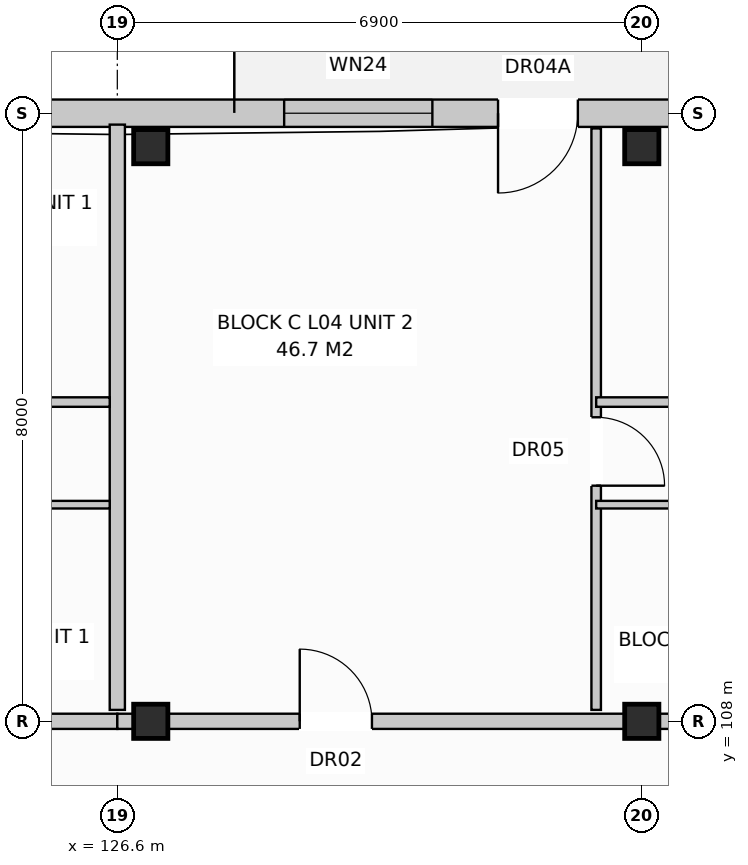
"""IFC4 building model, lengths in metres.
Left out: names, types, materials, properties, quantities, classifications, styles, units other than length and angle.
Written with IfcOpenShell. Run it as: python <this file> out.ifc"""

import sys

from ifc_helpers import new_model, si_unit, direction, frame, frame_2d, origin, origin_with_axes, origin_2d, place, context, subcontext, project, spatial, rectangle, extrude, element, fill, save


model = new_model("IFC4")
c1 = context("Model", 3, precision=1e-05, world=origin(), true_north=direction((0.0, 1.0)))
c2 = subcontext(c1, "Body", "Model", "MODEL_VIEW")
j1 = project(units=[si_unit("LENGTHUNIT", "METRE"), si_unit("PLANEANGLEUNIT", "RADIAN")], contexts=[c1])
p1 = place(None, origin())
s1 = spatial("IfcSite", under=j1, at=p1, CompositionType="ELEMENT")
p2 = place(p1, origin())
s2 = spatial("IfcBuilding", under=s1, at=p2, CompositionType="ELEMENT")
p3 = place(p2, frame((0.0, 0.0, 14.4)))
s3 = spatial("IfcBuildingStorey", under=s2, at=p3, CompositionType="ELEMENT", Elevation=14.4)
for number, where, z_axis, x_axis in (
    (1, (127.04, 108.0, 0.0), (0.0, 0.0, 1.0), (1.0, 0.0, 0.0)),
    (2, (127.04, 115.56, 0.0), (0.0, 0.0, 1.0), (1.0, 0.0, 0.0)),
    (3, (133.5, 108.0, 0.0), (0.0, 0.0, 1.0), (1.0, 0.0, 0.0)),
    (4, (133.5, 115.56, 0.0), (0.0, 0.0, 1.0), (1.0, 0.0, 0.0)),
):
    element("IfcColumn", number, at=place(p3, frame(where, z_axis=z_axis, x_axis=x_axis)), inside=s3, PredefinedType="COLUMN", context=c2, shape_type="SweptSolid", body=[
        extrude(rectangle(XDim=0.45, YDim=0.45, at=origin_2d()), origin(), (0.0, 0.0, 1.0), 3.2),
    ])
p4 = place(p3, frame((112.97, 116.0, 0.0), z_axis=(0.0, 0.0, 1.0), x_axis=(1.0, 0.0, 0.0)))
e5 = element("IfcWall", 5, at=p4, inside=s3, PredefinedType="STANDARD", context=c2, shape_type="SweptSolid", body=[
    extrude(rectangle(XDim=54.86, YDim=0.36, at=frame_2d((27.43, 0.0))), origin(), (0.0, 0.0, 1.0), 2.94),
])
p5 = place(p4, frame((3.779, 0.0, 0.0)))
e6 = element("IfcOpeningElement", 6, at=p5, cuts=e5, PredefinedType="OPENING", context=c2, shape_type="SweptSolid", body=[
    extrude(rectangle(XDim=1.05, YDim=2.12, at=frame_2d((0.525, 1.06))), frame((0.0, 0.192, 0.0), z_axis=(0.0, -1.0, 0.0), x_axis=(1.0, 0.0, 0.0)), (0.0, 0.0, 1.0), 0.384),
])
p6 = place(p4, frame((18.639, 0.0, 0.0)))
e7 = element("IfcOpeningElement", 7, at=p6, cuts=e5, PredefinedType="OPENING", context=c2, shape_type="SweptSolid", body=[
    extrude(rectangle(XDim=1.05, YDim=2.12, at=frame_2d((0.525, 1.06))), frame((0.0, 0.192, 0.0), z_axis=(0.0, -1.0, 0.0), x_axis=(1.0, 0.0, 0.0)), (0.0, 0.0, 1.0), 0.384),
])
p7 = place(p4, frame((29.039, 0.0, 0.0)))
e8 = element("IfcOpeningElement", 8, at=p7, cuts=e5, PredefinedType="OPENING", context=c2, shape_type="SweptSolid", body=[
    extrude(rectangle(XDim=1.05, YDim=2.12, at=frame_2d((0.525, 1.06))), frame((0.0, 0.192, 0.0), z_axis=(0.0, -1.0, 0.0), x_axis=(1.0, 0.0, 0.0)), (0.0, 0.0, 1.0), 0.384),
])
p8 = place(p4, frame((46.45, 0.0, 0.0)))
e9 = element("IfcOpeningElement", 9, at=p8, cuts=e5, PredefinedType="OPENING", context=c2, shape_type="SweptSolid", body=[
    extrude(rectangle(XDim=1.05, YDim=2.12, at=frame_2d((0.525, 1.06))), frame((0.0, 0.192, 0.0), z_axis=(0.0, -1.0, 0.0), x_axis=(1.0, 0.0, 0.0)), (0.0, 0.0, 1.0), 0.384),
])
p9 = place(p4, frame((1.525, 0.0, 0.8)))
e10 = element("IfcOpeningElement", 10, at=p9, cuts=e5, PredefinedType="OPENING", context=c2, shape_type="SweptSolid", body=[
    extrude(rectangle(XDim=1.95, YDim=1.65, at=frame_2d((0.975, 0.825))), frame((0.0, 0.192, 0.0), z_axis=(0.0, -1.0, 0.0), x_axis=(1.0, 0.0, 0.0)), (0.0, 0.0, 1.0), 0.384),
])
p10 = place(p4, frame((7.65, 0.0, 0.72)))
e11 = element("IfcOpeningElement", 11, at=p10, cuts=e5, PredefinedType="OPENING", context=c2, shape_type="SweptSolid", body=[
    extrude(rectangle(XDim=1.1, YDim=1.5, at=frame_2d((0.55, 0.75))), frame((0.0, 0.192, 0.0), z_axis=(0.0, -1.0, 0.0), x_axis=(1.0, 0.0, 0.0)), (0.0, 0.0, 1.0), 0.384),
])
p11 = place(p4, frame((10.45, 0.0, 0.8)))
e12 = element("IfcOpeningElement", 12, at=p11, cuts=e5, PredefinedType="OPENING", context=c2, shape_type="SweptSolid", body=[
    extrude(rectangle(XDim=1.9, YDim=1.85, at=frame_2d((0.95, 0.925))), frame((0.0, 0.192, 0.0), z_axis=(0.0, -1.0, 0.0), x_axis=(1.0, 0.0, 0.0)), (0.0, 0.0, 1.0), 0.384),
])
p12 = place(p4, frame((15.825, 0.0, 0.8)))
e13 = element("IfcOpeningElement", 13, at=p12, cuts=e5, PredefinedType="OPENING", context=c2, shape_type="SweptSolid", body=[
    extrude(rectangle(XDim=1.95, YDim=1.65, at=frame_2d((0.975, 0.825))), frame((0.0, 0.192, 0.0), z_axis=(0.0, -1.0, 0.0), x_axis=(1.0, 0.0, 0.0)), (0.0, 0.0, 1.0), 0.384),
])
p13 = place(p4, frame((21.6, 0.0, 0.8)))
e14 = element("IfcOpeningElement", 14, at=p13, cuts=e5, PredefinedType="OPENING", context=c2, shape_type="SweptSolid", body=[
    extrude(rectangle(XDim=1.8, YDim=1.7, at=frame_2d((0.9, 0.85))), frame((0.0, 0.192, 0.0), z_axis=(0.0, -1.0, 0.0), x_axis=(1.0, 0.0, 0.0)), (0.0, 0.0, 1.0), 0.384),
])
p14 = place(p4, frame((25.6, 0.0, 0.72)))
e15 = element("IfcOpeningElement", 15, at=p14, cuts=e5, PredefinedType="OPENING", context=c2, shape_type="SweptSolid", body=[
    extrude(rectangle(XDim=1.1, YDim=1.5, at=frame_2d((0.55, 0.75))), frame((0.0, 0.192, 0.0), z_axis=(0.0, -1.0, 0.0), x_axis=(1.0, 0.0, 0.0)), (0.0, 0.0, 1.0), 0.384),
])
p15 = place(p4, frame((31.325, 0.0, 0.8)))
e16 = element("IfcOpeningElement", 16, at=p15, cuts=e5, PredefinedType="OPENING", context=c2, shape_type="SweptSolid", body=[
    extrude(rectangle(XDim=1.95, YDim=1.65, at=frame_2d((0.975, 0.825))), frame((0.0, 0.192, 0.0), z_axis=(0.0, -1.0, 0.0), x_axis=(1.0, 0.0, 0.0)), (0.0, 0.0, 1.0), 0.384),
])
p16 = place(p4, frame((35.6, 0.0, 0.8)))
e17 = element("IfcOpeningElement", 17, at=p16, cuts=e5, PredefinedType="OPENING", context=c2, shape_type="SweptSolid", body=[
    extrude(rectangle(XDim=1.8, YDim=1.7, at=frame_2d((0.9, 0.85))), frame((0.0, 0.192, 0.0), z_axis=(0.0, -1.0, 0.0), x_axis=(1.0, 0.0, 0.0)), (0.0, 0.0, 1.0), 0.384),
])
p17 = place(p4, frame((39.25, 0.0, 0.72)))
e18 = element("IfcOpeningElement", 18, at=p17, cuts=e5, PredefinedType="OPENING", context=c2, shape_type="SweptSolid", body=[
    extrude(rectangle(XDim=1.1, YDim=1.5, at=frame_2d((0.55, 0.75))), frame((0.0, 0.192, 0.0), z_axis=(0.0, -1.0, 0.0), x_axis=(1.0, 0.0, 0.0)), (0.0, 0.0, 1.0), 0.384),
])
p18 = place(p4, frame((44.225, 0.0, 0.8)))
e19 = element("IfcOpeningElement", 19, at=p18, cuts=e5, PredefinedType="OPENING", context=c2, shape_type="SweptSolid", body=[
    extrude(rectangle(XDim=1.95, YDim=1.65, at=frame_2d((0.975, 0.825))), frame((0.0, 0.192, 0.0), z_axis=(0.0, -1.0, 0.0), x_axis=(1.0, 0.0, 0.0)), (0.0, 0.0, 1.0), 0.384),
])
p19 = place(p4, frame((49.2, 0.0, 0.8)))
e20 = element("IfcOpeningElement", 20, at=p19, cuts=e5, PredefinedType="OPENING", context=c2, shape_type="SweptSolid", body=[
    extrude(rectangle(XDim=1.8, YDim=1.7, at=frame_2d((0.9, 0.85))), frame((0.0, 0.192, 0.0), z_axis=(0.0, -1.0, 0.0), x_axis=(1.0, 0.0, 0.0)), (0.0, 0.0, 1.0), 0.384),
])
p20 = place(p4, frame((52.95, 0.0, 0.72)))
e21 = element("IfcOpeningElement", 21, at=p20, cuts=e5, PredefinedType="OPENING", context=c2, shape_type="SweptSolid", body=[
    extrude(rectangle(XDim=1.1, YDim=1.5, at=frame_2d((0.55, 0.75))), frame((0.0, 0.192, 0.0), z_axis=(0.0, -1.0, 0.0), x_axis=(1.0, 0.0, 0.0)), (0.0, 0.0, 1.0), 0.384),
])
p21 = place(p3, frame((126.6, 108.15, 0.0), z_axis=(0.0, 0.0, 1.0), x_axis=(0.0, 1.0, 0.0)))
e22 = element("IfcWall", 22, at=p21, inside=s3, PredefinedType="PARTITIONING", context=c2, shape_type="SweptSolid", body=[
    extrude(rectangle(XDim=7.7, YDim=0.2, at=frame_2d((3.85, 0.0))), origin(), (0.0, 0.0, 1.0), 2.94),
])
p22 = place(p3, frame((112.8, 108.0, 0.0), z_axis=(0.0, 0.0, 1.0), x_axis=(1.0, 0.0, 0.0)))
e23 = element("IfcWall", 23, at=p22, inside=s3, PredefinedType="PARTITIONING", context=c2, shape_type="SweptSolid", body=[
    extrude(rectangle(XDim=13.8, YDim=0.2, at=frame_2d((6.9, 0.0))), origin(), (0.0, 0.0, 1.0), 2.38),
])
p23 = place(p22, frame((2.4, 0.0, 0.0)))
e24 = element("IfcOpeningElement", 24, at=p23, cuts=e23, PredefinedType="OPENING", context=c2, shape_type="SweptSolid", body=[
    extrude(rectangle(XDim=0.95, YDim=2.15, at=frame_2d((0.475, 1.075))), frame((0.0, 0.112, 0.0), z_axis=(0.0, -1.0, 0.0), x_axis=(1.0, 0.0, 0.0)), (0.0, 0.0, 1.0), 0.224),
])
p24 = place(p3, frame((118.0, 110.85, 0.0), z_axis=(0.0, 0.0, 1.0), x_axis=(1.0, 0.0, 0.0)))
e25 = element("IfcWall", 25, at=p24, inside=s3, PredefinedType="PARTITIONING", context=c2, shape_type="SweptSolid", body=[
    extrude(rectangle(XDim=8.5, YDim=0.1, at=frame_2d((4.25, 0.0))), origin(), (0.0, 0.0, 1.0), 2.94),
])
p25 = place(p24, frame((1.0, 0.0, 0.0)))
e26 = element("IfcOpeningElement", 26, at=p25, cuts=e25, PredefinedType="OPENING", context=c2, shape_type="SweptSolid", body=[
    extrude(rectangle(XDim=0.85, YDim=2.1, at=frame_2d((0.425, 1.05))), frame((0.0, 0.062, 0.0), z_axis=(0.0, -1.0, 0.0), x_axis=(1.0, 0.0, 0.0)), (0.0, 0.0, 1.0), 0.124),
])
p26 = place(p24, frame((3.4, 0.0, 0.0)))
e27 = element("IfcOpeningElement", 27, at=p26, cuts=e25, PredefinedType="OPENING", context=c2, shape_type="SweptSolid", body=[
    extrude(rectangle(XDim=0.85, YDim=2.05, at=frame_2d((0.425, 1.025))), frame((0.0, 0.062, 0.0), z_axis=(0.0, -1.0, 0.0), x_axis=(1.0, 0.0, 0.0)), (0.0, 0.0, 1.0), 0.124),
])
p27 = place(p24, frame((6.2, 0.0, 0.0)))
e28 = element("IfcOpeningElement", 28, at=p27, cuts=e25, PredefinedType="OPENING", context=c2, shape_type="SweptSolid", body=[
    extrude(rectangle(XDim=0.85, YDim=2.05, at=frame_2d((0.425, 1.025))), frame((0.0, 0.062, 0.0), z_axis=(0.0, -1.0, 0.0), x_axis=(1.0, 0.0, 0.0)), (0.0, 0.0, 1.0), 0.124),
])
p28 = place(p3, frame((118.0, 112.2, 0.0), z_axis=(0.0, 0.0, 1.0), x_axis=(1.0, 0.0, 0.0)))
e29 = element("IfcWall", 29, at=p28, inside=s3, PredefinedType="PARTITIONING", context=c2, shape_type="SweptSolid", body=[
    extrude(rectangle(XDim=8.5, YDim=0.125, at=frame_2d((4.25, 0.0))), origin(), (0.0, 0.0, 1.0), 2.94),
])
p29 = place(p28, frame((1.5, 0.0, 0.0)))
e30 = element("IfcOpeningElement", 30, at=p29, cuts=e29, PredefinedType="OPENING", context=c2, shape_type="SweptSolid", body=[
    extrude(rectangle(XDim=0.9, YDim=2.1, at=frame_2d((0.45, 1.05))), frame((0.0, 0.074, 0.0), z_axis=(0.0, -1.0, 0.0), x_axis=(1.0, 0.0, 0.0)), (0.0, 0.0, 1.0), 0.149),
])
p30 = place(p28, frame((5.6, 0.0, 0.0)))
e31 = element("IfcOpeningElement", 31, at=p30, cuts=e29, PredefinedType="OPENING", context=c2, shape_type="SweptSolid", body=[
    extrude(rectangle(XDim=0.9, YDim=2.1, at=frame_2d((0.45, 1.05))), frame((0.0, 0.074, 0.0), z_axis=(0.0, -1.0, 0.0), x_axis=(1.0, 0.0, 0.0)), (0.0, 0.0, 1.0), 0.149),
])
p31 = place(p3, frame((126.6, 108.0, 0.0), z_axis=(0.0, 0.0, 1.0), x_axis=(1.0, 0.0, 0.0)))
e32 = element("IfcWall", 32, at=p31, inside=s3, PredefinedType="PARTITIONING", context=c2, shape_type="SweptSolid", body=[
    extrude(rectangle(XDim=20.7, YDim=0.2, at=frame_2d((10.35, 0.0))), origin(), (0.0, 0.0, 1.0), 2.38),
])
p32 = place(p31, frame((2.4, 0.0, 0.0)))
e33 = element("IfcOpeningElement", 33, at=p32, cuts=e32, PredefinedType="OPENING", context=c2, shape_type="SweptSolid", body=[
    extrude(rectangle(XDim=0.95, YDim=2.15, at=frame_2d((0.475, 1.075))), frame((0.0, 0.112, 0.0), z_axis=(0.0, -1.0, 0.0), x_axis=(1.0, 0.0, 0.0)), (0.0, 0.0, 1.0), 0.224),
])
p33 = place(p3, frame((132.9, 108.15, 0.0), z_axis=(0.0, 0.0, 1.0), x_axis=(0.0, 1.0, 0.0)))
e34 = element("IfcWall", 34, at=p33, inside=s3, PredefinedType="PARTITIONING", context=c2, shape_type="SweptSolid", body=[
    extrude(rectangle(XDim=7.65, YDim=0.125, at=frame_2d((3.825, 0.0))), origin(), (0.0, 0.0, 1.0), 2.94),
])
p34 = place(p33, frame((2.95, 0.0, 0.0)))
e35 = element("IfcOpeningElement", 35, at=p34, cuts=e34, PredefinedType="OPENING", context=c2, shape_type="SweptSolid", body=[
    extrude(rectangle(XDim=0.9, YDim=2.1, at=frame_2d((0.45, 1.05))), frame((0.0, 0.074, 0.0), z_axis=(0.0, -1.0, 0.0), x_axis=(1.0, 0.0, 0.0)), (0.0, 0.0, 1.0), 0.149),
])
p35 = place(p3, frame((132.9, 110.85, 0.0), z_axis=(0.0, 0.0, 1.0), x_axis=(1.0, 0.0, 0.0)))
e36 = element("IfcWall", 36, at=p35, inside=s3, PredefinedType="PARTITIONING", context=c2, shape_type="SweptSolid", body=[
    extrude(rectangle(XDim=14.3, YDim=0.1, at=frame_2d((7.15, 0.0))), origin(), (0.0, 0.0, 1.0), 2.94),
])
p36 = place(p35, frame((1.6, 0.0, 0.0)))
e37 = element("IfcOpeningElement", 37, at=p36, cuts=e36, PredefinedType="OPENING", context=c2, shape_type="SweptSolid", body=[
    extrude(rectangle(XDim=0.9, YDim=2.1, at=frame_2d((0.45, 1.05))), frame((0.0, 0.062, 0.0), z_axis=(0.0, -1.0, 0.0), x_axis=(1.0, 0.0, 0.0)), (0.0, 0.0, 1.0), 0.124),
])
p37 = place(p35, frame((5.1, 0.0, 0.0)))
e38 = element("IfcOpeningElement", 38, at=p37, cuts=e36, PredefinedType="OPENING", context=c2, shape_type="SweptSolid", body=[
    extrude(rectangle(XDim=0.85, YDim=2.05, at=frame_2d((0.425, 1.025))), frame((0.0, 0.062, 0.0), z_axis=(0.0, -1.0, 0.0), x_axis=(1.0, 0.0, 0.0)), (0.0, 0.0, 1.0), 0.124),
])
p38 = place(p35, frame((8.2, 0.0, 0.0)))
e39 = element("IfcOpeningElement", 39, at=p38, cuts=e36, PredefinedType="OPENING", context=c2, shape_type="SweptSolid", body=[
    extrude(rectangle(XDim=0.85, YDim=2.05, at=frame_2d((0.425, 1.025))), frame((0.0, 0.062, 0.0), z_axis=(0.0, -1.0, 0.0), x_axis=(1.0, 0.0, 0.0)), (0.0, 0.0, 1.0), 0.124),
])
p39 = place(p35, frame((11.6, 0.0, 0.0)))
e40 = element("IfcOpeningElement", 40, at=p39, cuts=e36, PredefinedType="OPENING", context=c2, shape_type="SweptSolid", body=[
    extrude(rectangle(XDim=0.85, YDim=2.05, at=frame_2d((0.425, 1.025))), frame((0.0, 0.062, 0.0), z_axis=(0.0, -1.0, 0.0), x_axis=(1.0, 0.0, 0.0)), (0.0, 0.0, 1.0), 0.124),
])
p40 = place(p3, frame((132.9, 112.2, 0.0), z_axis=(0.0, 0.0, 1.0), x_axis=(1.0, 0.0, 0.0)))
e41 = element("IfcWall", 41, at=p40, inside=s3, PredefinedType="PARTITIONING", context=c2, shape_type="SweptSolid", body=[
    extrude(rectangle(XDim=10.4, YDim=0.125, at=frame_2d((5.2, 0.0))), origin(), (0.0, 0.0, 1.0), 2.94),
])
p41 = place(p40, frame((2.0, 0.0, 0.0)))
e42 = element("IfcOpeningElement", 42, at=p41, cuts=e41, PredefinedType="OPENING", context=c2, shape_type="SweptSolid", body=[
    extrude(rectangle(XDim=0.9, YDim=2.1, at=frame_2d((0.45, 1.05))), frame((0.0, 0.074, 0.0), z_axis=(0.0, -1.0, 0.0), x_axis=(1.0, 0.0, 0.0)), (0.0, 0.0, 1.0), 0.149),
])
p42 = place(p40, frame((7.2, 0.0, 0.0)))
e43 = element("IfcOpeningElement", 43, at=p42, cuts=e41, PredefinedType="OPENING", context=c2, shape_type="SweptSolid", body=[
    extrude(rectangle(XDim=0.9, YDim=2.1, at=frame_2d((0.45, 1.05))), frame((0.0, 0.074, 0.0), z_axis=(0.0, -1.0, 0.0), x_axis=(1.0, 0.0, 0.0)), (0.0, 0.0, 1.0), 0.149),
])
p43 = place(p6, frame((1.05, 0.0, 0.0), z_axis=(0.0, 0.0, 1.0), x_axis=(-1.0, 0.0, 0.0)))
e44 = element("IfcDoor", 44, at=p43, inside=s3, OperationType="SINGLE_SWING_LEFT", PredefinedType="DOOR", context=c2, shape_type="SweptSolid", body=[
    extrude(rectangle(XDim=1.05, YDim=2.12, at=frame_2d((0.525, 1.06))), frame((0.0, 0.025, 0.0), z_axis=(0.0, -1.0, 0.0), x_axis=(1.0, 0.0, 0.0)), (0.0, 0.0, 1.0), 0.05),
])
fill(e7, e44)
p44 = place(p12, origin_with_axes())
e45 = element("IfcWindow", 45, at=p44, inside=s3, PartitioningType="SINGLE_PANEL", PredefinedType="WINDOW", context=c2, shape_type="SweptSolid", body=[
    extrude(rectangle(XDim=1.95, YDim=1.65, at=frame_2d((0.975, 0.825))), frame((0.0, 0.03, 0.0), z_axis=(0.0, -1.0, 0.0), x_axis=(1.0, 0.0, 0.0)), (0.0, 0.0, 1.0), 0.06),
])
fill(e13, e45)
p45 = place(p32, origin_with_axes())
e46 = element("IfcDoor", 46, at=p45, inside=s3, OperationType="SINGLE_SWING_LEFT", PredefinedType="DOOR", context=c2, shape_type="SweptSolid", body=[
    extrude(rectangle(XDim=0.95, YDim=2.15, at=frame_2d((0.475, 1.075))), frame((0.0, 0.025, 0.0), z_axis=(0.0, -1.0, 0.0), x_axis=(1.0, 0.0, 0.0)), (0.0, 0.0, 1.0), 0.05),
])
fill(e33, e46)
p46 = place(p34, frame((0.9, 0.0, 0.0), z_axis=(0.0, 0.0, 1.0), x_axis=(-1.0, 0.0, 0.0)))
e47 = element("IfcDoor", 47, at=p46, inside=s3, OperationType="SINGLE_SWING_LEFT", PredefinedType="DOOR", context=c2, shape_type="SweptSolid", body=[
    extrude(rectangle(XDim=0.9, YDim=2.1, at=frame_2d((0.45, 1.05))), frame((0.0, 0.025, 0.0), z_axis=(0.0, -1.0, 0.0), x_axis=(1.0, 0.0, 0.0)), (0.0, 0.0, 1.0), 0.05),
])
fill(e35, e47)
save(model, sys.argv[1])
